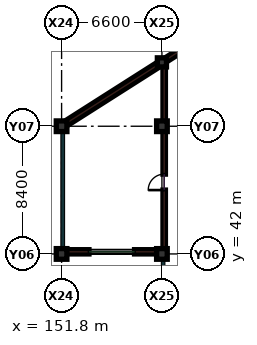
"""IFC4 building model, lengths in metres.
Left out: names, types, materials, properties, quantities, classifications, styles, units other than length and angle.
Written with IfcOpenShell. Run it as: python <this file> out.ifc"""

import sys

from ifc_helpers import new_model, si_unit, direction, frame, frame_2d, origin, origin_2d, place, context, subcontext, project, spatial, rectangle, extrude, element, fill, save


model = new_model("IFC4")
c1 = context("Model", 3, precision=1e-05, world=origin(), true_north=direction((0.0, 1.0)))
c2 = subcontext(c1, "Body", "Model", "MODEL_VIEW")
j1 = project(units=[si_unit("LENGTHUNIT", "METRE"), si_unit("PLANEANGLEUNIT", "RADIAN")], contexts=[c1])
p1 = place(None, origin())
s1 = spatial("IfcSite", under=j1, at=p1, CompositionType="ELEMENT")
p2 = place(p1, origin())
s2 = spatial("IfcBuilding", under=s1, at=p2, CompositionType="ELEMENT")
p3 = place(p2, frame((0.0, 0.0, 18.6)))
s3 = spatial("IfcBuildingStorey", under=s2, at=p3, CompositionType="ELEMENT", Elevation=18.6)
for number, where, z_axis, x_axis in (
    (1, (151.8, 42.0, 0.0), (0.0, 0.0, 1.0), (1.0, 0.0, 0.0)),
    (2, (151.8, 50.4, 0.0), (0.0, 0.0, 1.0), (1.0, 0.0, 0.0)),
    (3, (158.4, 42.0, 0.0), (0.0, 0.0, 1.0), (1.0, 0.0, 0.0)),
    (4, (158.4, 50.4, 0.0), (0.0, 0.0, 1.0), (1.0, 0.0, 0.0)),
):
    element("IfcColumn", number, at=place(p3, frame(where, z_axis=z_axis, x_axis=x_axis)), inside=s3, PredefinedType="COLUMN", context=c2, shape_type="SweptSolid", body=[
        extrude(rectangle(XDim=0.7, YDim=0.7, at=origin_2d()), origin(), (0.0, 0.0, 1.0), 4.2),
    ])
p4 = place(p3, frame((158.4, 54.6, 0.0), z_axis=(0.0, 0.0, 1.0), x_axis=(1.0, 0.0, 0.0)))
e5 = element("IfcColumn", 5, at=p4, inside=s3, PredefinedType="COLUMN", context=c2, shape_type="SweptSolid", body=[
    extrude(rectangle(XDim=0.6, YDim=0.6, at=origin_2d()), origin(), (0.0, 0.0, 1.0), 4.2),
])
p5 = place(p3, frame((158.55, 42.0, 0.0), z_axis=(0.0, 0.0, 1.0), x_axis=(0.0, 1.0, 0.0)))
e6 = element("IfcWall", 6, at=p5, inside=s3, PredefinedType="PARTITIONING", context=c2, shape_type="SweptSolid", body=[
    extrude(rectangle(XDim=7.95, YDim=0.16, at=frame_2d((3.975, 0.0))), origin(), (0.0, 0.0, 1.0), 3.19),
])
p6 = place(p5, frame((4.2, 0.0, 0.0)))
e7 = element("IfcOpeningElement", 7, at=p6, cuts=e6, PredefinedType="OPENING", context=c2, shape_type="SweptSolid", body=[
    extrude(rectangle(XDim=1.05, YDim=2.15, at=frame_2d((0.525, 1.075))), frame((0.0, 0.09, 0.0), z_axis=(0.0, -1.0, 0.0), x_axis=(1.0, 0.0, 0.0)), (0.0, 0.0, 1.0), 0.18),
])
p7 = place(p3, frame((158.55, 50.85, 0.0), z_axis=(0.0, 0.0, 1.0), x_axis=(0.0, 1.0, 0.0)))
e8 = element("IfcWall", 8, at=p7, inside=s3, PredefinedType="PARTITIONING", context=c2, shape_type="SweptSolid", body=[
    extrude(rectangle(XDim=3.8, YDim=0.16, at=frame_2d((1.9, 0.0))), origin(), (0.0, 0.0, 1.0), 3.19),
])
p8 = place(p3, frame((152.145, 42.14, 0.0), z_axis=(0.0, 0.0, 1.0), x_axis=(1.0, 0.0, 0.0)))
e9 = element("IfcWall", 9, at=p8, inside=s3, PredefinedType="SOLIDWALL", context=c2, shape_type="SweptSolid", body=[
    extrude(rectangle(XDim=5.91, YDim=0.28, at=frame_2d((2.955, 0.0))), origin(), (0.0, 0.0, 1.0), 3.325),
])
p9 = place(p8, frame((1.455, 0.0, 0.95)))
e10 = element("IfcOpeningElement", 10, at=p9, cuts=e9, PredefinedType="OPENING", context=c2, shape_type="SweptSolid", body=[
    extrude(rectangle(XDim=3.0, YDim=1.8, at=frame_2d((1.5, 0.9))), frame((0.0, 0.15, 0.0), z_axis=(0.0, -1.0, 0.0), x_axis=(1.0, 0.0, 0.0)), (0.0, 0.0, 1.0), 0.3),
])
p10 = place(p3, frame((152.05, 50.56, 0.0), z_axis=(0.0, 0.0, 1.0), x_axis=(0.843776886751, 0.536694107835, 0.0)))
e11 = element("IfcWall", 11, at=p10, inside=s3, PredefinedType="SHEAR", context=c2, shape_type="SweptSolid", body=[
    extrude(rectangle(XDim=7.229, YDim=0.34, at=frame_2d((3.615, 0.0))), origin(), (0.0, 0.0, 1.0), 3.94),
])
p11 = place(p3, frame((158.65, 54.76, 0.0), z_axis=(0.0, 0.0, 1.0), x_axis=(0.843786613851, 0.536678814829, 0.0)))
e12 = element("IfcWall", 12, at=p11, inside=s3, PredefinedType="SOLIDWALL", context=c2, shape_type="SweptSolid", body=[
    extrude(rectangle(XDim=7.229, YDim=0.28, at=frame_2d((3.615, 0.0))), origin(), (0.0, 0.0, 1.0), 3.325),
])
p12 = place(p11, frame((2.415, 0.0, 0.95)))
e13 = element("IfcOpeningElement", 13, at=p12, cuts=e12, PredefinedType="OPENING", context=c2, shape_type="SweptSolid", body=[
    extrude(rectangle(XDim=2.4, YDim=1.6, at=frame_2d((1.2, 0.8))), frame((0.0, 0.15, 0.0), z_axis=(0.0, -1.0, 0.0), x_axis=(1.0, 0.0, 0.0)), (0.0, 0.0, 1.0), 0.3),
])
p13 = place(p6, origin())
e14 = element("IfcDoor", 14, at=p13, inside=s3, OperationType="SINGLE_SWING_LEFT", PredefinedType="DOOR", context=c2, shape_type="SweptSolid", body=[
    extrude(rectangle(XDim=1.05, YDim=2.15, at=frame_2d((0.525, 1.075))), frame((0.0, 0.025, 0.0), z_axis=(0.0, -1.0, 0.0), x_axis=(1.0, 0.0, 0.0)), (0.0, 0.0, 1.0), 0.05),
])
fill(e7, e14)
p14 = place(p9, origin())
e15 = element("IfcWindow", 15, at=p14, inside=s3, PartitioningType="SINGLE_PANEL", PredefinedType="WINDOW", context=c2, shape_type="SweptSolid", body=[
    extrude(rectangle(XDim=3.0, YDim=1.8, at=frame_2d((1.5, 0.9))), frame((0.0, 0.03, 0.0), z_axis=(0.0, -1.0, 0.0), x_axis=(1.0, 0.0, 0.0)), (0.0, 0.0, 1.0), 0.06),
])
fill(e10, e15)
save(model, sys.argv[1])
